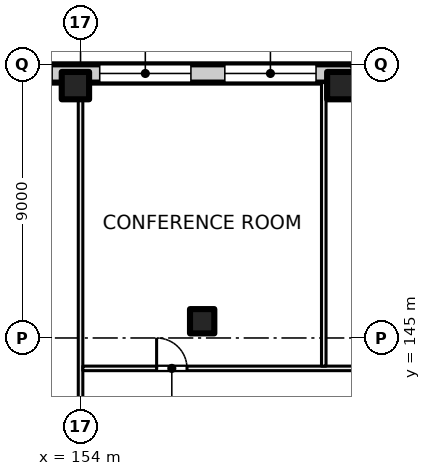
"""IFC4 building model, lengths in metres.
Left out: names, types, materials, properties, quantities, classifications, styles, units other than length and angle.
Written with IfcOpenShell. Run it as: python <this file> out.ifc"""

import sys

from ifc_helpers import new_model, si_unit, direction, frame, frame_2d, origin, origin_2d, place, context, subcontext, project, spatial, rectangle, extrude, element, fill, save


model = new_model("IFC4")
c1 = context("Model", 3, precision=1e-05, world=origin(), true_north=direction((0.0, 1.0)))
c2 = subcontext(c1, "Body", "Model", "MODEL_VIEW")
j1 = project(units=[si_unit("LENGTHUNIT", "METRE"), si_unit("PLANEANGLEUNIT", "RADIAN")], contexts=[c1])
p1 = place(None, origin())
s1 = spatial("IfcSite", under=j1, at=p1, CompositionType="ELEMENT")
p2 = place(p1, origin())
s2 = spatial("IfcBuilding", under=s1, at=p2, CompositionType="ELEMENT")
p3 = place(p2, frame((0.0, 0.0, 22.5)))
s3 = spatial("IfcBuildingStorey", under=s2, at=p3, CompositionType="ELEMENT", Elevation=22.5)
for number, where, z_axis, x_axis in (
    (1, (153.831, 153.3, 0.0), (0.0, 0.0, 1.0), (1.0, 0.0, 0.0)),
    (2, (162.561, 153.3, 0.0), (0.0, 0.0, 1.0), (1.0, 0.0, 0.0)),
):
    element("IfcColumn", number, at=place(p3, frame(where, z_axis=z_axis, x_axis=x_axis)), inside=s3, PredefinedType="COLUMN", context=c2, shape_type="SweptSolid", body=[
        extrude(rectangle(XDim=0.9, YDim=0.9, at=origin_2d()), origin(), (0.0, 0.0, 1.0), 5.0),
    ])
p4 = place(p3, frame((158.0, 145.55, 0.0), z_axis=(0.0, 0.0, 1.0), x_axis=(1.0, 0.0, 0.0)))
e3 = element("IfcColumn", 3, at=p4, inside=s3, PredefinedType="COLUMN", context=c2, shape_type="SweptSolid", body=[
    extrude(rectangle(XDim=0.8, YDim=0.8, at=origin_2d()), origin(), (0.0, 0.0, 1.0), 5.0),
])
p5 = place(p3, frame((162.939, 153.703, 0.0), z_axis=(0.0, 0.0, 1.0), x_axis=(0.991440646942, -0.130558200013, 0.0)))
e4 = element("IfcWall", 4, at=p5, inside=s3, PredefinedType="SOLIDWALL", context=c2, shape_type="SweptSolid", body=[
    extrude(rectangle(XDim=2.132, YDim=0.6, at=frame_2d((1.066, 0.0))), origin(), (0.0, 0.0, 1.0), 4.625),
])
p6 = place(p3, frame((131.022, 153.7, 0.0), z_axis=(0.0, 0.0, 1.0), x_axis=(1.0, 0.0, 0.0)))
e5 = element("IfcWall", 5, at=p6, inside=s3, PredefinedType="SOLIDWALL", context=c2, shape_type="SweptSolid", body=[
    extrude(rectangle(XDim=31.957, YDim=0.6, at=frame_2d((15.978, 0.0))), origin(), (0.0, 0.0, 1.0), 4.625),
])
p7 = place(p6, frame((0.783, 0.0, 0.9)))
e6 = element("IfcOpeningElement", 6, at=p7, cuts=e5, PredefinedType="OPENING", context=c2, shape_type="SweptSolid", body=[
    extrude(rectangle(XDim=3.0, YDim=3.0, at=frame_2d((1.5, 1.5))), frame((0.0, 0.31, 0.0), z_axis=(0.0, -1.0, 0.0), x_axis=(1.0, 0.0, 0.0)), (0.0, 0.0, 1.0), 0.62),
])
p8 = place(p6, frame((9.913, 0.0, 0.9)))
e7 = element("IfcOpeningElement", 7, at=p8, cuts=e5, PredefinedType="OPENING", context=c2, shape_type="SweptSolid", body=[
    extrude(rectangle(XDim=3.0, YDim=3.0, at=frame_2d((1.5, 1.5))), frame((0.0, 0.31, 0.0), z_axis=(0.0, -1.0, 0.0), x_axis=(1.0, 0.0, 0.0)), (0.0, 0.0, 1.0), 0.62),
])
p9 = place(p6, frame((14.928, 0.0, 0.9)))
e8 = element("IfcOpeningElement", 8, at=p9, cuts=e5, PredefinedType="OPENING", context=c2, shape_type="SweptSolid", body=[
    extrude(rectangle(XDim=3.0, YDim=3.0, at=frame_2d((1.5, 1.5))), frame((0.0, 0.31, 0.0), z_axis=(0.0, -1.0, 0.0), x_axis=(1.0, 0.0, 0.0)), (0.0, 0.0, 1.0), 0.62),
])
p10 = place(p6, frame((19.043, 0.0, 0.9)))
e9 = element("IfcOpeningElement", 9, at=p10, cuts=e5, PredefinedType="OPENING", context=c2, shape_type="SweptSolid", body=[
    extrude(rectangle(XDim=3.0, YDim=3.0, at=frame_2d((1.5, 1.5))), frame((0.0, 0.31, 0.0), z_axis=(0.0, -1.0, 0.0), x_axis=(1.0, 0.0, 0.0)), (0.0, 0.0, 1.0), 0.62),
])
p11 = place(p6, frame((23.609, 0.0, 0.9)))
e10 = element("IfcOpeningElement", 10, at=p11, cuts=e5, PredefinedType="OPENING", context=c2, shape_type="SweptSolid", body=[
    extrude(rectangle(XDim=3.0, YDim=3.0, at=frame_2d((1.5, 1.5))), frame((0.0, 0.31, 0.0), z_axis=(0.0, -1.0, 0.0), x_axis=(1.0, 0.0, 0.0)), (0.0, 0.0, 1.0), 0.62),
])
p12 = place(p6, frame((27.724, 0.0, 0.9)))
e11 = element("IfcOpeningElement", 11, at=p12, cuts=e5, PredefinedType="OPENING", context=c2, shape_type="SweptSolid", body=[
    extrude(rectangle(XDim=3.0, YDim=3.0, at=frame_2d((1.5, 1.5))), frame((0.0, 0.31, 0.0), z_axis=(0.0, -1.0, 0.0), x_axis=(1.0, 0.0, 0.0)), (0.0, 0.0, 1.0), 0.62),
])
p13 = place(p3, frame((154.0, 153.4, 0.0), z_axis=(0.0, 0.0, 1.0), x_axis=(0.0, -1.0, 0.0)))
e12 = element("IfcWall", 12, at=p13, inside=s3, PredefinedType="PARTITIONING", context=c2, shape_type="SweptSolid", body=[
    extrude(rectangle(XDim=14.4, YDim=0.15, at=frame_2d((7.2, 0.0))), origin(), (0.0, 0.0, 1.0), 4.625),
])
p14 = place(p13, frame((11.0, 0.0, 0.0)))
e13 = element("IfcOpeningElement", 13, at=p14, cuts=e12, PredefinedType="OPENING", context=c2, shape_type="SweptSolid", body=[
    extrude(rectangle(XDim=1.8, YDim=2.1, at=frame_2d((0.9, 1.05))), frame((0.0, 0.085, 0.0), z_axis=(0.0, -1.0, 0.0), x_axis=(1.0, 0.0, 0.0)), (0.0, 0.0, 1.0), 0.17),
])
p15 = place(p3, frame((154.075, 144.0, 0.0), z_axis=(0.0, 0.0, 1.0), x_axis=(1.0, 0.0, 0.0)))
e14 = element("IfcWall", 14, at=p15, inside=s3, PredefinedType="PARTITIONING", context=c2, shape_type="SweptSolid", body=[
    extrude(rectangle(XDim=12.927, YDim=0.15, at=frame_2d((6.463, 0.0))), origin(), (0.0, 0.0, 1.0), 4.625),
])
p16 = place(p15, frame((2.427, 0.0, 0.0)))
e15 = element("IfcOpeningElement", 15, at=p16, cuts=e14, PredefinedType="OPENING", context=c2, shape_type="SweptSolid", body=[
    extrude(rectangle(XDim=1.0, YDim=2.1, at=frame_2d((0.5, 1.05))), frame((0.0, 0.085, 0.0), z_axis=(0.0, -1.0, 0.0), x_axis=(1.0, 0.0, 0.0)), (0.0, 0.0, 1.0), 0.17),
])
p17 = place(p15, frame((9.623, 0.0, 0.0)))
e16 = element("IfcOpeningElement", 16, at=p17, cuts=e14, PredefinedType="OPENING", context=c2, shape_type="SweptSolid", body=[
    extrude(rectangle(XDim=1.0, YDim=2.1, at=frame_2d((0.5, 1.05))), frame((0.0, 0.085, 0.0), z_axis=(0.0, -1.0, 0.0), x_axis=(1.0, 0.0, 0.0)), (0.0, 0.0, 1.0), 0.17),
])
p18 = place(p3, frame((162.0, 144.075, 0.0), z_axis=(0.0, 0.0, 1.0), x_axis=(0.0, 1.0, 0.0)))
e17 = element("IfcWall", 17, at=p18, inside=s3, PredefinedType="PARTITIONING", context=c2, shape_type="SweptSolid", body=[
    extrude(rectangle(XDim=9.325, YDim=0.15, at=frame_2d((4.663, 0.0))), origin(), (0.0, 0.0, 1.0), 4.625),
])
p19 = place(p11, origin())
e18 = element("IfcWindow", 18, at=p19, inside=s3, PartitioningType="SINGLE_PANEL", PredefinedType="WINDOW", context=c2, shape_type="SweptSolid", body=[
    extrude(rectangle(XDim=3.0, YDim=3.0, at=frame_2d((1.5, 1.5))), frame((0.0, 0.03, 0.0), z_axis=(0.0, -1.0, 0.0), x_axis=(1.0, 0.0, 0.0)), (0.0, 0.0, 1.0), 0.06),
])
fill(e10, e18)
p20 = place(p12, origin())
e19 = element("IfcWindow", 19, at=p20, inside=s3, PartitioningType="SINGLE_PANEL", PredefinedType="WINDOW", context=c2, shape_type="SweptSolid", body=[
    extrude(rectangle(XDim=3.0, YDim=3.0, at=frame_2d((1.5, 1.5))), frame((0.0, 0.03, 0.0), z_axis=(0.0, -1.0, 0.0), x_axis=(1.0, 0.0, 0.0)), (0.0, 0.0, 1.0), 0.06),
])
fill(e11, e19)
p21 = place(p16, origin())
e20 = element("IfcDoor", 20, at=p21, inside=s3, OperationType="SINGLE_SWING_LEFT", PredefinedType="DOOR", context=c2, shape_type="SweptSolid", body=[
    extrude(rectangle(XDim=1.0, YDim=2.1, at=frame_2d((0.5, 1.05))), frame((0.0, 0.025, 0.0), z_axis=(0.0, -1.0, 0.0), x_axis=(1.0, 0.0, 0.0)), (0.0, 0.0, 1.0), 0.05),
])
fill(e15, e20)
save(model, sys.argv[1])
